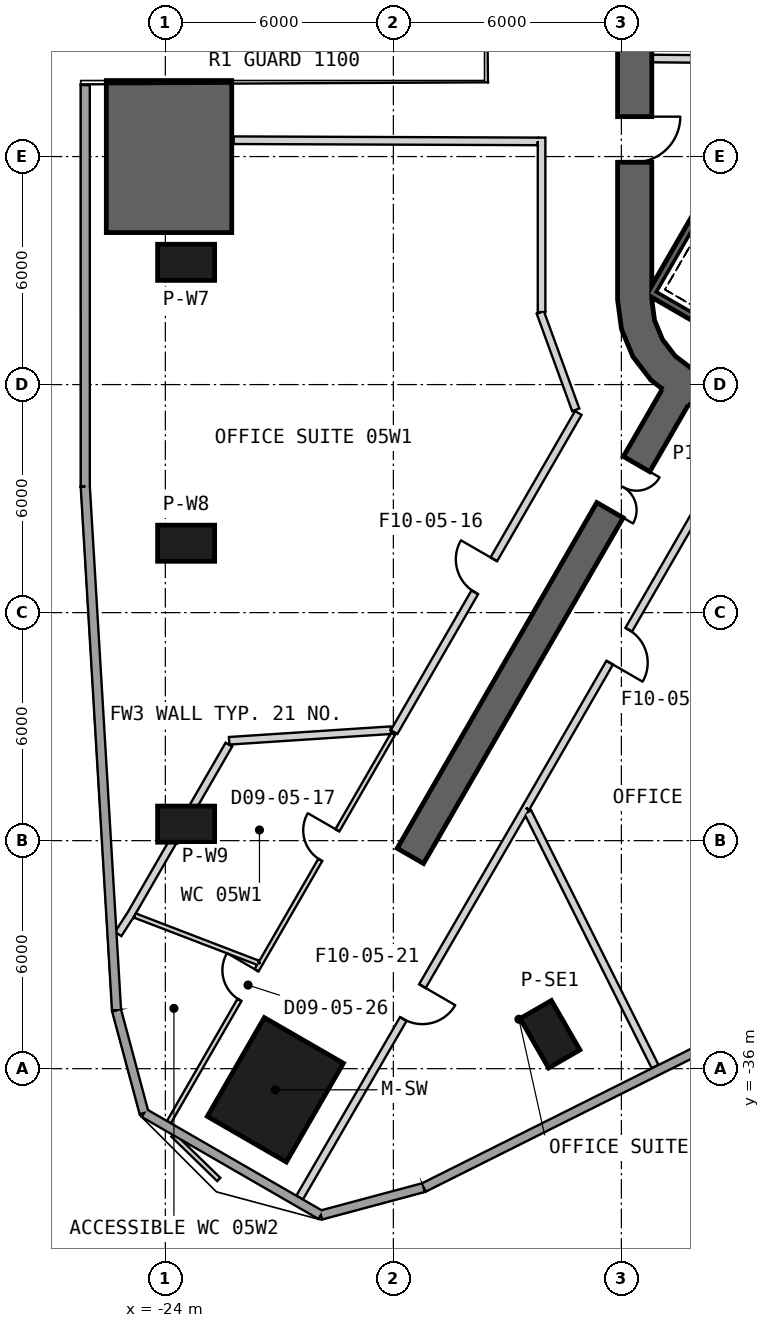
"""IFC4 building model, lengths in metres.
Left out: names, types, materials, properties, quantities, classifications, styles, units other than length and angle.
Written with IfcOpenShell. Run it as: python <this file> out.ifc"""

import sys

from ifc_helpers import new_model, si_unit, direction, frame, frame_2d, origin, origin_2d, place, context, subcontext, project, spatial, polyline, rectangle, outline, extrude, element, fill, save


model = new_model("IFC4")
c1 = context("Model", 3, precision=1e-05, world=origin(), true_north=direction((0.0, 1.0)))
c2 = subcontext(c1, "Body", "Model", "MODEL_VIEW")
j1 = project(units=[si_unit("LENGTHUNIT", "METRE"), si_unit("PLANEANGLEUNIT", "RADIAN")], contexts=[c1])
p1 = place(None, origin())
s1 = spatial("IfcSite", under=j1, at=p1, CompositionType="ELEMENT")
p2 = place(p1, origin())
s2 = spatial("IfcBuilding", under=s1, at=p2, CompositionType="ELEMENT")
p3 = place(p2, frame((0.0, 0.0, 33.5)))
s3 = spatial("IfcBuildingStorey", under=s2, at=p3, CompositionType="ELEMENT", Elevation=33.5)
p4 = place(p3, frame((-21.106, -36.556, 0.0), z_axis=(0.0, 0.0, 1.0), x_axis=(-0.5, -0.866025403784, 0.0)))
e1 = element("IfcColumn", 1, at=p4, inside=s3, PredefinedType="COLUMN", context=c2, shape_type="SweptSolid", body=[
    extrude(rectangle(XDim=3.0, YDim=2.4, at=origin_2d()), origin(), (0.0, 0.0, 1.0), 6.0),
])
for number, where, z_axis, x_axis in (
    (2, (-23.453, -14.783, 0.0), (0.0, 0.0, 1.0), (-1.0, 0.0, 0.0)),
    (3, (-23.453, -22.174, 0.0), (0.0, 0.0, 1.0), (-1.0, 0.0, 0.0)),
    (4, (-23.453, -29.566, 0.0), (0.0, 0.0, 1.0), (-1.0, 0.0, 0.0)),
    (5, (-13.878, -35.094, 0.0), (0.0, 0.0, 1.0), (0.5, -0.866, 0.0)),
):
    element("IfcColumn", number, at=place(p3, frame(where, z_axis=z_axis, x_axis=x_axis)), inside=s3, PredefinedType="COLUMN", context=c2, shape_type="SweptSolid", body=[
        extrude(rectangle(XDim=1.5, YDim=0.95, at=origin_2d()), origin(), (0.0, 0.0, 1.0), 6.0),
    ])
p5 = place(p3, frame((-11.65, 15.762, 0.0), z_axis=(0.0, 0.0, 1.0), x_axis=(0.0, -1.0, 0.0)))
e6 = element("IfcWall", 6, at=p5, inside=s3, PredefinedType="SHEAR", context=c2, shape_type="SweptSolid", body=[
    extrude(rectangle(XDim=31.523, YDim=0.9, at=frame_2d((15.762, 0.0))), origin(), (0.0, 0.0, 1.0), 6.0),
])
p6 = place(p5, frame((7.062, 0.0, 0.0)))
e7 = element("IfcOpeningElement", 7, at=p6, cuts=e6, PredefinedType="OPENING", context=c2, shape_type="SweptSolid", body=[
    extrude(rectangle(XDim=1.2, YDim=2.4, at=frame_2d((0.6, 1.2))), frame((0.0, 0.46, 0.0), z_axis=(0.0, -1.0, 0.0), x_axis=(1.0, 0.0, 0.0)), (0.0, 0.0, 1.0), 0.92),
])
p7 = place(p5, frame((9.762, 0.0, 0.0)))
e8 = element("IfcOpeningElement", 8, at=p7, cuts=e6, PredefinedType="OPENING", context=c2, shape_type="SweptSolid", body=[
    extrude(rectangle(XDim=1.2, YDim=2.4, at=frame_2d((0.6, 1.2))), frame((0.0, 0.46, 0.0), z_axis=(0.0, -1.0, 0.0), x_axis=(1.0, 0.0, 0.0)), (0.0, 0.0, 1.0), 0.92),
])
p8 = place(p5, frame((12.462, 0.0, 0.0)))
e9 = element("IfcOpeningElement", 9, at=p8, cuts=e6, PredefinedType="OPENING", context=c2, shape_type="SweptSolid", body=[
    extrude(rectangle(XDim=1.2, YDim=2.4, at=frame_2d((0.6, 1.2))), frame((0.0, 0.46, 0.0), z_axis=(0.0, -1.0, 0.0), x_axis=(1.0, 0.0, 0.0)), (0.0, 0.0, 1.0), 0.92),
])
p9 = place(p5, frame((15.162, 0.0, 0.0)))
e10 = element("IfcOpeningElement", 10, at=p9, cuts=e6, PredefinedType="OPENING", context=c2, shape_type="SweptSolid", body=[
    extrude(rectangle(XDim=1.2, YDim=2.4, at=frame_2d((0.6, 1.2))), frame((0.0, 0.46, 0.0), z_axis=(0.0, -1.0, 0.0), x_axis=(1.0, 0.0, 0.0)), (0.0, 0.0, 1.0), 0.92),
])
p10 = place(p5, frame((17.862, 0.0, 0.0)))
e11 = element("IfcOpeningElement", 11, at=p10, cuts=e6, PredefinedType="OPENING", context=c2, shape_type="SweptSolid", body=[
    extrude(rectangle(XDim=1.2, YDim=2.4, at=frame_2d((0.6, 1.2))), frame((0.0, 0.46, 0.0), z_axis=(0.0, -1.0, 0.0), x_axis=(1.0, 0.0, 0.0)), (0.0, 0.0, 1.0), 0.92),
])
p11 = place(p5, frame((20.562, 0.0, 0.0)))
e12 = element("IfcOpeningElement", 12, at=p11, cuts=e6, PredefinedType="OPENING", context=c2, shape_type="SweptSolid", body=[
    extrude(rectangle(XDim=1.2, YDim=2.4, at=frame_2d((0.6, 1.2))), frame((0.0, 0.46, 0.0), z_axis=(0.0, -1.0, 0.0), x_axis=(1.0, 0.0, 0.0)), (0.0, 0.0, 1.0), 0.92),
])
p12 = place(p5, frame((23.262, 0.0, 0.0)))
e13 = element("IfcOpeningElement", 13, at=p12, cuts=e6, PredefinedType="OPENING", context=c2, shape_type="SweptSolid", body=[
    extrude(rectangle(XDim=1.2, YDim=2.4, at=frame_2d((0.6, 1.2))), frame((0.0, 0.46, 0.0), z_axis=(0.0, -1.0, 0.0), x_axis=(1.0, 0.0, 0.0)), (0.0, 0.0, 1.0), 0.92),
])
p13 = place(p5, frame((3.612, 0.0, 0.0)))
e14 = element("IfcOpeningElement", 14, at=p13, cuts=e6, PredefinedType="OPENING", context=c2, shape_type="SweptSolid", body=[
    extrude(rectangle(XDim=1.2, YDim=2.4, at=frame_2d((0.6, 1.2))), frame((0.0, 0.46, 0.0), z_axis=(0.0, -1.0, 0.0), x_axis=(1.0, 0.0, 0.0)), (0.0, 0.0, 1.0), 0.92),
])
p14 = place(p5, frame((26.712, 0.0, 0.0)))
e15 = element("IfcOpeningElement", 15, at=p14, cuts=e6, PredefinedType="OPENING", context=c2, shape_type="SweptSolid", body=[
    extrude(rectangle(XDim=1.2, YDim=2.4, at=frame_2d((0.6, 1.2))), frame((0.0, 0.46, 0.0), z_axis=(0.0, -1.0, 0.0), x_axis=(1.0, 0.0, 0.0)), (0.0, 0.0, 1.0), 0.92),
])
p15 = place(p3, origin())
e16 = element("IfcWall", 16, at=p15, inside=s3, PredefinedType="SHEAR", context=c2, shape_type="SweptSolid", body=[
    extrude(outline(polyline([(-12.1, -15.762), (-11.998, -16.538), (-11.698, -17.262), (-11.221, -17.883), (-10.6, -18.36), (-9.876, -18.659), (-9.1, -18.762), (-8.323, -18.659), (-7.6, -18.36), (-8.05, -17.58), (-8.556, -17.79), (-9.1, -17.862), (-9.644, -17.79), (-10.15, -17.58), (-10.585, -17.247), (-10.919, -16.812), (-11.128, -16.305), (-11.2, -15.762), (-12.1, -15.762)])), origin(), (0.0, 0.0, 1.0), 6.0),
])
p16 = place(p3, frame((-10.575, -18.316, 0.0), z_axis=(0.0, 0.0, 1.0), x_axis=(-0.499996575515, -0.866027380903, 0.0)))
e17 = element("IfcWall", 17, at=p16, inside=s3, PredefinedType="SHEAR", context=c2, shape_type="SweptSolid", body=[
    extrude(rectangle(XDim=13.954, YDim=0.8, at=frame_2d((6.977, 0.0))), origin(), (0.0, 0.0, 1.0), 6.0),
])
p17 = place(p16, frame((2.05, 0.0, 0.0)))
e18 = element("IfcOpeningElement", 18, at=p17, cuts=e17, PredefinedType="OPENING", context=c2, shape_type="SweptSolid", body=[
    extrude(rectangle(XDim=1.4, YDim=2.4, at=frame_2d((0.7, 1.2))), frame((0.0, 0.41, 0.0), z_axis=(0.0, -1.0, 0.0), x_axis=(1.0, 0.0, 0.0)), (0.0, 0.0, 1.0), 0.82),
])
p18 = place(p3, origin())
e19 = element("IfcWall", 19, at=p18, inside=s3, PredefinedType="SHEAR", context=c2, shape_type="SweptSolid", body=[
    extrude(outline(polyline([(-25.553, -10.0), (-25.553, -14.0), (-22.253, -14.0), (-22.253, -10.0), (-25.553, -10.0)])), origin(), (0.0, 0.0, 1.0), 6.0),
])
p19 = place(p3, frame((-26.108, -10.119, 0.0), z_axis=(0.0, 0.0, 1.0), x_axis=(6.9319284e-05, -0.999999997597, 0.0)))
e20 = element("IfcWall", 20, at=p19, inside=s3, PredefinedType="SOLIDWALL", context=c2, shape_type="SweptSolid", body=[
    extrude(rectangle(XDim=10.566, YDim=0.24, at=frame_2d((5.283, 0.0))), origin(), (0.0, 0.0, 1.0), 5.65),
])
p20 = place(p3, frame((-26.107, -20.685, 0.0), z_axis=(0.0, 0.0, 1.0), x_axis=(0.059596169304, -0.998222568671, 0.0)))
e21 = element("IfcWall", 21, at=p20, inside=s3, PredefinedType="SOLIDWALL", context=c2, shape_type="SweptSolid", body=[
    extrude(rectangle(XDim=13.801, YDim=0.24, at=frame_2d((6.901, 0.0))), origin(), (0.0, 0.0, 1.0), 5.65),
])
p21 = place(p3, frame((-25.284, -34.462, 0.0), z_axis=(0.0, 0.0, 1.0), x_axis=(0.258850842196, -0.965917305723, 0.0)))
e22 = element("IfcWall", 22, at=p21, inside=s3, PredefinedType="SOLIDWALL", context=c2, shape_type="SweptSolid", body=[
    extrude(rectangle(XDim=2.8, YDim=0.24, at=frame_2d((1.4, 0.0))), origin(), (0.0, 0.0, 1.0), 5.65),
])
p22 = place(p3, frame((-24.56, -37.167, 0.0), z_axis=(0.0, 0.0, 1.0), x_axis=(0.866010734295, -0.500025407441, 0.0)))
e23 = element("IfcWall", 23, at=p22, inside=s3, PredefinedType="SOLIDWALL", context=c2, shape_type="SweptSolid", body=[
    extrude(rectangle(XDim=5.371, YDim=0.24, at=frame_2d((2.686, 0.0))), origin(), (0.0, 0.0, 1.0), 5.65),
])
p23 = place(p3, frame((-19.908, -39.853, 0.0), z_axis=(0.0, 0.0, 1.0), x_axis=(0.965923146675, 0.25882904535, 0.0)))
e24 = element("IfcWall", 24, at=p23, inside=s3, PredefinedType="SOLIDWALL", context=c2, shape_type="SweptSolid", body=[
    extrude(rectangle(XDim=2.801, YDim=0.24, at=frame_2d((1.4, 0.0))), origin(), (0.0, 0.0, 1.0), 5.65),
])
p24 = place(p3, frame((-17.203, -39.128, 0.0), z_axis=(0.0, 0.0, 1.0), x_axis=(0.894377655106, 0.447312653573, 0.0)))
e25 = element("IfcWall", 25, at=p24, inside=s3, PredefinedType="SOLIDWALL", context=c2, shape_type="SweptSolid", body=[
    extrude(rectangle(XDim=13.802, YDim=0.24, at=frame_2d((6.901, 0.0))), origin(), (0.0, 0.0, 1.0), 5.65),
])
p25 = place(p3, frame((-8.05, -9.449, 0.0), z_axis=(0.0, 0.0, 1.0), x_axis=(-0.999957467379, 0.009222983926, 0.0)))
e26 = element("IfcWall", 26, at=p25, inside=s3, PredefinedType="PLUMBINGWALL", context=c2, shape_type="SweptSolid", body=[
    extrude(rectangle(XDim=3.15, YDim=0.2, at=frame_2d((1.575, 0.0))), origin(), (0.0, 0.0, 1.0), 5.65),
])
p26 = place(p3, frame((-11.282, -15.541, -0.3), z_axis=(0.0, 0.0, 1.0), x_axis=(0.866000578957, -0.500042995397, 0.0)))
e27 = element("IfcWall", 27, at=p26, inside=s3, PredefinedType="SHEAR", context=c2, shape_type="SweptSolid", body=[
    extrude(rectangle(XDim=1.89, YDim=0.2, at=frame_2d((0.945, 0.0))), origin(), (0.0, 0.0, 1.0), 5.95),
])
p27 = place(p3, frame((-7.196, -8.663, -0.3), z_axis=(0.0, 0.0, 1.0), x_axis=(-0.499997992926, -0.866026562566, 0.0)))
e28 = element("IfcWall", 28, at=p27, inside=s3, PredefinedType="SHEAR", context=c2, shape_type="SweptSolid", body=[
    extrude(rectangle(XDim=7.9, YDim=0.2, at=frame_2d((3.95, 0.0))), origin(), (0.0, 0.0, 1.0), 5.95),
])
p28 = place(p3, frame((-17.98, -27.143, 0.0), z_axis=(0.0, 0.0, 1.0), x_axis=(0.499987665054, 0.866032525252, 0.0)))
e29 = element("IfcWall", 29, at=p28, inside=s3, PredefinedType="PARTITIONING", context=c2, shape_type="SweptSolid", body=[
    extrude(rectangle(XDim=9.695, YDim=0.2, at=frame_2d((4.848, 0.0))), origin(), (0.0, 0.0, 1.0), 5.65),
])
p29 = place(p28, frame((4.249, 0.0, 0.0)))
e30 = element("IfcOpeningElement", 30, at=p29, cuts=e29, PredefinedType="OPENING", context=c2, shape_type="SweptSolid", body=[
    extrude(rectangle(XDim=1.0, YDim=2.1, at=frame_2d((0.5, 1.05))), frame((0.0, 0.11, 0.0), z_axis=(0.0, -1.0, 0.0), x_axis=(1.0, 0.0, 0.0)), (0.0, 0.0, 1.0), 0.22),
])
p30 = place(p3, frame((-14.134, -16.1, 0.0), z_axis=(0.0, 0.0, 1.0), x_axis=(0.341951326322, -0.939717665273, 0.0)))
e31 = element("IfcWall", 31, at=p30, inside=s3, PredefinedType="PARTITIONING", context=c2, shape_type="SweptSolid", body=[
    extrude(rectangle(XDim=2.729, YDim=0.2, at=frame_2d((1.365, 0.0))), origin(), (0.0, 0.0, 1.0), 4.73),
])
p31 = place(p3, frame((-14.1, -11.501, 0.0), z_axis=(0.0, 0.0, 1.0), x_axis=(0.0, -1.0, 0.0)))
e32 = element("IfcWall", 32, at=p31, inside=s3, PredefinedType="PARTITIONING", context=c2, shape_type="SweptSolid", body=[
    extrude(rectangle(XDim=4.592, YDim=0.2, at=frame_2d((2.296, 0.0))), origin(), (0.0, 0.0, 1.0), 4.83),
])
p32 = place(p3, frame((-22.203, -11.57, 0.0), z_axis=(0.0, 0.0, 1.0), x_axis=(0.999992495389, -0.003874166344, 0.0)))
e33 = element("IfcWall", 33, at=p32, inside=s3, PredefinedType="PARTITIONING", context=c2, shape_type="SweptSolid", body=[
    extrude(rectangle(XDim=8.003, YDim=0.2, at=frame_2d((4.001, 0.0))), origin(), (0.0, 0.0, 1.0), 4.83),
])
p33 = place(p3, frame((-23.906, -37.406, 0.0), z_axis=(0.0, 0.0, 1.0), x_axis=(0.500013369766, 0.866017684609, 0.0)))
e34 = element("IfcWall", 34, at=p33, inside=s3, PredefinedType="PARTITIONING", context=c2, shape_type="SweptSolid", body=[
    extrude(rectangle(XDim=4.819, YDim=0.12, at=frame_2d((2.409, 0.0))), origin(), (0.0, 0.0, 1.0), 5.65),
])
p34 = place(p33, frame((3.714, 0.0, 0.0)))
e35 = element("IfcOpeningElement", 35, at=p34, cuts=e34, PredefinedType="OPENING", context=c2, shape_type="SweptSolid", body=[
    extrude(rectangle(XDim=0.9, YDim=2.1, at=frame_2d((0.45, 1.05))), frame((0.0, 0.07, 0.0), z_axis=(0.0, -1.0, 0.0), x_axis=(1.0, 0.0, 0.0)), (0.0, 0.0, 1.0), 0.14),
])
p35 = place(p3, frame((-21.496, -33.233, 0.0), z_axis=(0.0, 0.0, 1.0), x_axis=(0.500000091514, 0.866025350949, 0.0)))
e36 = element("IfcWall", 36, at=p35, inside=s3, PredefinedType="PARTITIONING", context=c2, shape_type="SweptSolid", body=[
    extrude(rectangle(XDim=6.978, YDim=0.12, at=frame_2d((3.489, 0.0))), origin(), (0.0, 0.0, 1.0), 5.65),
])
p36 = place(p35, frame((3.148, 0.0, 0.0)))
e37 = element("IfcOpeningElement", 37, at=p36, cuts=e36, PredefinedType="OPENING", context=c2, shape_type="SweptSolid", body=[
    extrude(rectangle(XDim=0.9, YDim=2.1, at=frame_2d((0.45, 1.05))), frame((0.0, 0.07, 0.0), z_axis=(0.0, -1.0, 0.0), x_axis=(1.0, 0.0, 0.0)), (0.0, 0.0, 1.0), 0.14),
])
p37 = place(p3, frame((-23.8, -37.744, 0.0), z_axis=(0.0, 0.0, 1.0), x_axis=(0.717273158196, -0.696792089888, 0.0)))
e38 = element("IfcWall", 38, at=p37, inside=s3, PredefinedType="PARTITIONING", context=c2, shape_type="SweptSolid", body=[
    extrude(rectangle(XDim=1.681, YDim=0.12, at=frame_2d((0.84, 0.0))), origin(), (0.0, 0.0, 1.0), 5.65),
])
p38 = place(p3, frame((-22.321, -27.373, 0.0), z_axis=(0.0, 0.0, 1.0), x_axis=(0.997859032733, 0.065401458642, 0.0)))
e39 = element("IfcWall", 39, at=p38, inside=s3, PredefinedType="PARTITIONING", context=c2, shape_type="SweptSolid", body=[
    extrude(rectangle(XDim=4.263, YDim=0.2, at=frame_2d((2.131, 0.0))), origin(), (0.0, 0.0, 1.0), 4.73),
])
p39 = place(p3, frame((-24.932, -31.984, 0.0), z_axis=(0.0, 0.0, 1.0), x_axis=(0.500010513267, 0.866019333862, 0.0)))
e40 = element("IfcWall", 40, at=p39, inside=s3, PredefinedType="PARTITIONING", context=c2, shape_type="SweptSolid", body=[
    extrude(rectangle(XDim=5.209, YDim=0.2, at=frame_2d((2.604, 0.0))), origin(), (0.0, 0.0, 1.0), 4.73),
])
p40 = place(p3, frame((-25.241, -32.458, 0.0), z_axis=(0.0, 0.0, 1.0), x_axis=(0.540924282728, 0.841071293266, 0.0)))
e41 = element("IfcWall", 41, at=p40, inside=s3, PredefinedType="PARTITIONING", context=c2, shape_type="SweptSolid", body=[
    extrude(rectangle(XDim=0.666, YDim=0.2, at=frame_2d((0.333, 0.0))), origin(), (0.0, 0.0, 1.0), 5.65),
])
p41 = place(p3, frame((-24.808, -31.968, 0.0), z_axis=(0.0, 0.0, 1.0), x_axis=(0.933675816779, -0.358119350445, 0.0)))
e42 = element("IfcWall", 42, at=p41, inside=s3, PredefinedType="PARTITIONING", context=c2, shape_type="SweptSolid", body=[
    extrude(rectangle(XDim=3.483, YDim=0.12, at=frame_2d((1.741, 0.0))), origin(), (0.0, 0.0, 1.0), 5.65),
])
p42 = place(p3, frame((-14.514, -29.139, 0.0), z_axis=(0.0, 0.0, 1.0), x_axis=(-0.502061989067, -0.864831636294, 0.0)))
e43 = element("IfcWall", 43, at=p42, inside=s3, PredefinedType="PARTITIONING", context=c2, shape_type="SweptSolid", body=[
    extrude(rectangle(XDim=11.855, YDim=0.2, at=frame_2d((5.928, 0.0))), origin(), (0.0, 0.0, 1.0), 5.65),
])
p43 = place(p42, frame((5.421, 0.0, 0.0)))
e44 = element("IfcOpeningElement", 44, at=p43, cuts=e43, PredefinedType="OPENING", context=c2, shape_type="SweptSolid", body=[
    extrude(rectangle(XDim=1.0, YDim=2.1, at=frame_2d((0.5, 1.05))), frame((0.0, 0.11, 0.0), z_axis=(0.0, -1.0, 0.0), x_axis=(1.0, 0.0, 0.0)), (0.0, 0.0, 1.0), 0.22),
])
p44 = place(p3, frame((-9.758, -20.901, 0.0), z_axis=(0.0, 0.0, 1.0), x_axis=(-0.499997931106, -0.866026598257, 0.0)))
e45 = element("IfcWall", 45, at=p44, inside=s3, PredefinedType="PARTITIONING", context=c2, shape_type="SweptSolid", body=[
    extrude(rectangle(XDim=9.513, YDim=0.2, at=frame_2d((4.756, 0.0))), origin(), (0.0, 0.0, 1.0), 5.65),
])
p45 = place(p44, frame((4.1, 0.0, 0.0)))
e46 = element("IfcOpeningElement", 46, at=p45, cuts=e45, PredefinedType="OPENING", context=c2, shape_type="SweptSolid", body=[
    extrude(rectangle(XDim=1.0, YDim=2.1, at=frame_2d((0.5, 1.05))), frame((0.0, 0.11, 0.0), z_axis=(0.0, -1.0, 0.0), x_axis=(1.0, 0.0, 0.0)), (0.0, 0.0, 1.0), 0.22),
])
p46 = place(p3, frame((-14.462, -29.248, 0.0), z_axis=(0.0, 0.0, 1.0), x_axis=(0.447304919826, -0.894381523009, 0.0)))
e47 = element("IfcWall", 47, at=p46, inside=s3, PredefinedType="PARTITIONING", context=c2, shape_type="SweptSolid", body=[
    extrude(rectangle(XDim=7.485, YDim=0.2, at=frame_2d((3.743, 0.0))), origin(), (0.0, 0.0, 1.0), 4.73),
])
p47 = place(p29, origin())
e48 = element("IfcDoor", 48, at=p47, inside=s3, OperationType="SINGLE_SWING_RIGHT", PredefinedType="USERDEFINED", context=c2, shape_type="SweptSolid", body=[
    extrude(rectangle(XDim=1.0, YDim=2.1, at=frame_2d((0.5, 1.05))), frame((0.0, 0.025, 0.0), z_axis=(0.0, -1.0, 0.0), x_axis=(1.0, 0.0, 0.0)), (0.0, 0.0, 1.0), 0.05),
])
fill(e30, e48)
p48 = place(p36, origin())
e49 = element("IfcDoor", 49, at=p48, inside=s3, OperationType="SINGLE_SWING_RIGHT", PredefinedType="NOTDEFINED", context=c2, shape_type="SweptSolid", body=[
    extrude(rectangle(XDim=0.9, YDim=2.1, at=frame_2d((0.45, 1.05))), frame((0.0, 0.025, 0.0), z_axis=(0.0, -1.0, 0.0), x_axis=(1.0, 0.0, 0.0)), (0.0, 0.0, 1.0), 0.05),
])
fill(e37, e49)
p49 = place(p43, origin())
e50 = element("IfcDoor", 50, at=p49, inside=s3, OperationType="SINGLE_SWING_LEFT", PredefinedType="USERDEFINED", context=c2, shape_type="SweptSolid", body=[
    extrude(rectangle(XDim=1.0, YDim=2.1, at=frame_2d((0.5, 1.05))), frame((0.0, 0.025, 0.0), z_axis=(0.0, -1.0, 0.0), x_axis=(1.0, 0.0, 0.0)), (0.0, 0.0, 1.0), 0.05),
])
fill(e44, e50)
p50 = place(p45, origin())
e51 = element("IfcDoor", 51, at=p50, inside=s3, OperationType="SINGLE_SWING_RIGHT", PredefinedType="USERDEFINED", context=c2, shape_type="SweptSolid", body=[
    extrude(rectangle(XDim=1.0, YDim=2.1, at=frame_2d((0.5, 1.05))), frame((0.0, 0.025, 0.0), z_axis=(0.0, -1.0, 0.0), x_axis=(1.0, 0.0, 0.0)), (0.0, 0.0, 1.0), 0.05),
])
fill(e46, e51)
p51 = place(p34, origin())
e52 = element("IfcDoor", 52, at=p51, inside=s3, OperationType="SINGLE_SWING_RIGHT", PredefinedType="NOTDEFINED", context=c2, shape_type="SweptSolid", body=[
    extrude(rectangle(XDim=0.9, YDim=2.1, at=frame_2d((0.45, 1.05))), frame((0.0, 0.025, 0.0), z_axis=(0.0, -1.0, 0.0), x_axis=(1.0, 0.0, 0.0)), (0.0, 0.0, 1.0), 0.05),
])
fill(e35, e52)
p52 = place(p14, origin())
e53 = element("IfcDoor", 53, at=p52, inside=s3, OperationType="SINGLE_SWING_LEFT", PredefinedType="USERDEFINED", context=c2, shape_type="SweptSolid", body=[
    extrude(rectangle(XDim=1.2, YDim=2.4, at=frame_2d((0.6, 1.2))), frame((0.0, 0.025, 0.0), z_axis=(0.0, -1.0, 0.0), x_axis=(1.0, 0.0, 0.0)), (0.0, 0.0, 1.0), 0.05),
])
fill(e15, e53)
p53 = place(p17, origin())
e54 = element("IfcDoor", 54, at=p53, inside=s3, OperationType="DOUBLE_DOOR_SINGLE_SWING", PredefinedType="NOTDEFINED", context=c2, shape_type="SweptSolid", body=[
    extrude(rectangle(XDim=1.4, YDim=2.4, at=frame_2d((0.7, 1.2))), frame((0.0, 0.025, 0.0), z_axis=(0.0, -1.0, 0.0), x_axis=(1.0, 0.0, 0.0)), (0.0, 0.0, 1.0), 0.05),
])
fill(e18, e54)
save(model, sys.argv[1])
